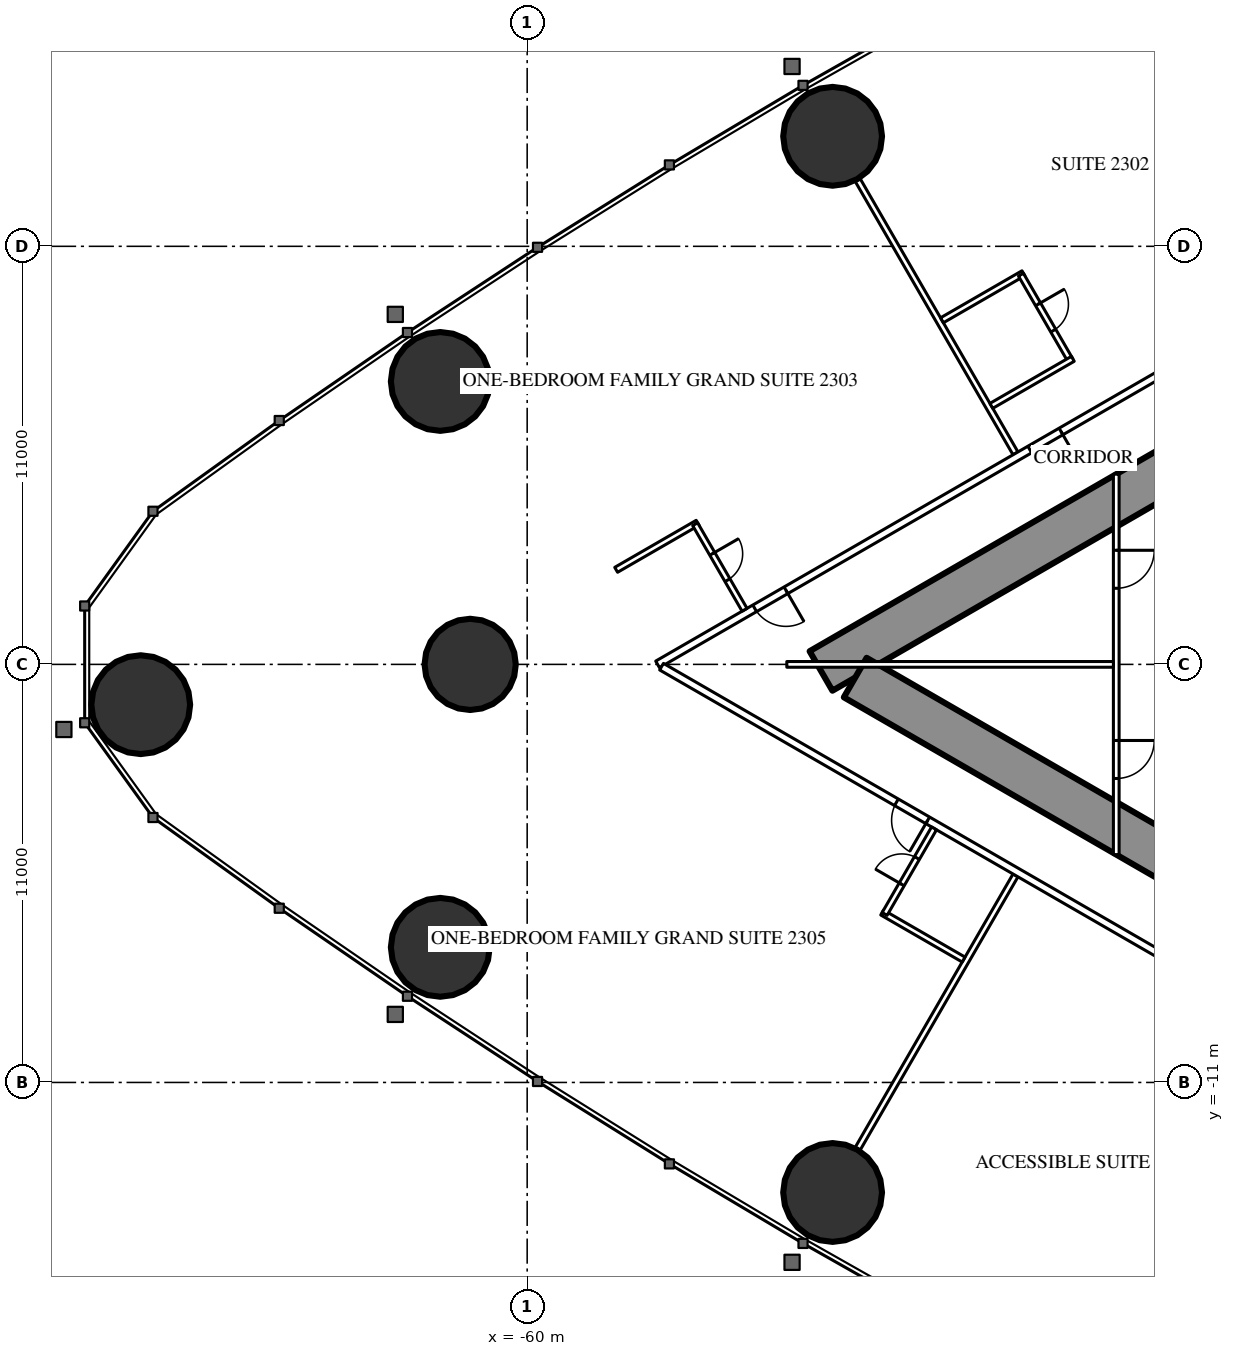
"""IFC4 building model, lengths in metres.
Left out: names, types, materials, properties, quantities, classifications, styles, units other than length and angle.
Written with IfcOpenShell. Run it as: python <this file> out.ifc"""

import sys

from ifc_helpers import new_model, si_unit, direction, frame, frame_2d, origin, origin_2d, place, context, subcontext, project, spatial, rectangle, circle, hollow_circle, extrude, element, fill, save


model = new_model("IFC4")
c1 = context("Model", 3, precision=1e-05, world=origin(), true_north=direction((0.0, 1.0)))
c2 = subcontext(c1, "Body", "Model", "MODEL_VIEW")
j1 = project(units=[si_unit("LENGTHUNIT", "METRE"), si_unit("PLANEANGLEUNIT", "RADIAN")], contexts=[c1])
p1 = place(None, origin())
s1 = spatial("IfcSite", under=j1, at=p1, CompositionType="ELEMENT")
p2 = place(p1, origin())
s2 = spatial("IfcBuilding", under=s1, at=p2, CompositionType="ELEMENT")
p3 = place(p2, frame((0.0, 0.0, 90.6)))
s3 = spatial("IfcBuildingStorey", under=s2, at=p3, CompositionType="ELEMENT", Elevation=90.6)
for number, where, z_axis, x_axis in (
    (1, (-70.168, -1.06, 0.0), (0.0, 0.0, 1.0), (1.0, 0.0, 0.0)),
    (2, (-62.287, -7.445, 0.0), (0.0, 0.0, 1.0), (1.0, 0.0, 0.0)),
    (3, (-51.963, -13.895, 0.0), (0.0, 0.0, 1.0), (1.0, 0.0, 0.0)),
    (4, (-51.963, 13.895, 0.0), (0.0, 0.0, 1.0), (1.0, 0.0, 0.0)),
    (5, (-62.287, 7.445, 0.0), (0.0, 0.0, 1.0), (1.0, 0.0, 0.0)),
):
    element("IfcColumn", number, at=place(p3, frame(where, z_axis=z_axis, x_axis=x_axis)), inside=s3, PredefinedType="COLUMN", context=c2, shape_type="SweptSolid", body=[
        extrude(hollow_circle(Radius=1.3, WallThickness=0.1, at=origin_2d()), origin(), (0.0, 0.0, 1.0), 3.5),
    ])
p4 = place(p3, frame((-61.5, 0.0, 0.0), z_axis=(0.0, 0.0, 1.0), x_axis=(1.0, 0.0, 0.0)))
e6 = element("IfcColumn", 6, at=p4, inside=s3, PredefinedType="COLUMN", context=c2, shape_type="SweptSolid", body=[
    extrude(circle(Radius=1.2, at=origin_2d()), origin(), (0.0, 0.0, 1.0), 3.5),
])
p5 = place(p3, frame((-27.2, 14.3, 0.0), z_axis=(0.0, 0.0, 1.0), x_axis=(-0.866026593062, -0.499997940104, 0.0)))
e7 = element("IfcWall", 7, at=p5, inside=s3, PredefinedType="SHEAR", context=c2, shape_type="SweptSolid", body=[
    extrude(rectangle(XDim=28.946, YDim=1.2, at=frame_2d((14.473, 0.0))), origin(), (0.0, 0.0, 1.0), 3.5),
])
p6 = place(p5, frame((4.6, 0.0, 0.0)))
e8 = element("IfcOpeningElement", 8, at=p6, cuts=e7, PredefinedType="OPENING", context=c2, shape_type="SweptSolid", body=[
    extrude(rectangle(XDim=1.0, YDim=2.2, at=frame_2d((0.5, 1.1))), frame((0.0, 0.61, 0.0), z_axis=(0.0, -1.0, 0.0), x_axis=(1.0, 0.0, 0.0)), (0.0, 0.0, 1.0), 1.22),
])
p7 = place(p5, frame((13.395, 0.0, 0.0)))
e9 = element("IfcOpeningElement", 9, at=p7, cuts=e7, PredefinedType="OPENING", context=c2, shape_type="SweptSolid", body=[
    extrude(rectangle(XDim=1.8, YDim=2.2, at=frame_2d((0.9, 1.1))), frame((0.0, 0.61, 0.0), z_axis=(0.0, -1.0, 0.0), x_axis=(1.0, 0.0, 0.0)), (0.0, 0.0, 1.0), 1.22),
])
p8 = place(p3, frame((-27.2, -14.3, 0.0), z_axis=(0.0, 0.0, 1.0), x_axis=(-0.866024021859, 0.500002393557, 0.0)))
e10 = element("IfcWall", 10, at=p8, inside=s3, PredefinedType="SHEAR", context=c2, shape_type="SweptSolid", body=[
    extrude(rectangle(XDim=27.907, YDim=1.2, at=frame_2d((13.954, 0.0))), origin(), (0.0, 0.0, 1.0), 3.5),
])
p9 = place(p8, frame((4.6, 0.0, 0.0)))
e11 = element("IfcOpeningElement", 11, at=p9, cuts=e10, PredefinedType="OPENING", context=c2, shape_type="SweptSolid", body=[
    extrude(rectangle(XDim=1.0, YDim=2.2, at=frame_2d((0.5, 1.1))), frame((0.0, 0.61, 0.0), z_axis=(0.0, -1.0, 0.0), x_axis=(1.0, 0.0, 0.0)), (0.0, 0.0, 1.0), 1.22),
])
p10 = place(p8, frame((13.395, 0.0, 0.0)))
e12 = element("IfcOpeningElement", 12, at=p10, cuts=e10, PredefinedType="OPENING", context=c2, shape_type="SweptSolid", body=[
    extrude(rectangle(XDim=1.8, YDim=2.2, at=frame_2d((0.9, 1.1))), frame((0.0, 0.61, 0.0), z_axis=(0.0, -1.0, 0.0), x_axis=(1.0, 0.0, 0.0)), (0.0, 0.0, 1.0), 1.22),
])
for number, where, z_axis, x_axis in (
    (13, (-47.151, 5.552, 0.0), (0.0, 0.0, 1.0), (-0.5, 0.866, 0.0)),
    (14, (-47.151, -5.552, 0.0), (0.0, 0.0, 1.0), (-0.5, -0.866, 0.0)),
):
    element("IfcWall", number, at=place(p3, frame(where, z_axis=z_axis, x_axis=x_axis)), inside=s3, PredefinedType="PARTITIONING", context=c2, shape_type="SweptSolid", body=[
        extrude(rectangle(XDim=8.311, YDim=0.15, at=frame_2d((4.156, 0.0))), origin(), (0.0, 0.0, 1.0), 2.2),
    ])
p11 = place(p3, frame((-37.7, 10.894, 0.0), z_axis=(0.0, 0.0, 1.0), x_axis=(-0.866027905338, -0.499995667157, 0.0)))
e15 = element("IfcWall", 15, at=p11, inside=s3, PredefinedType="PARTITIONING", context=c2, shape_type="SweptSolid", body=[
    extrude(rectangle(XDim=21.787, YDim=0.2, at=frame_2d((10.894, 0.0))), origin(), (0.0, 0.0, 1.0), 3.25),
])
p12 = place(p11, frame((17.887, 0.0, 0.0)))
e16 = element("IfcOpeningElement", 16, at=p12, cuts=e15, PredefinedType="OPENING", context=c2, shape_type="SweptSolid", body=[
    extrude(rectangle(XDim=0.95, YDim=2.2, at=frame_2d((0.475, 1.1))), frame((0.0, 0.11, 0.0), z_axis=(0.0, -1.0, 0.0), x_axis=(1.0, 0.0, 0.0)), (0.0, 0.0, 1.0), 0.22),
])
p13 = place(p11, frame((9.531, 0.0, 0.0)))
e17 = element("IfcOpeningElement", 17, at=p13, cuts=e15, PredefinedType="OPENING", context=c2, shape_type="SweptSolid", body=[
    extrude(rectangle(XDim=0.95, YDim=2.2, at=frame_2d((0.475, 1.1))), frame((0.0, 0.11, 0.0), z_axis=(0.0, -1.0, 0.0), x_axis=(1.0, 0.0, 0.0)), (0.0, 0.0, 1.0), 0.22),
])
p14 = place(p3, frame((-36.92, -11.344, 0.0), z_axis=(0.0, 0.0, 1.0), x_axis=(-0.866028313256, 0.499994960614, 0.0)))
e18 = element("IfcWall", 18, at=p14, inside=s3, PredefinedType="PARTITIONING", context=c2, shape_type="SweptSolid", body=[
    extrude(rectangle(XDim=22.568, YDim=0.2, at=frame_2d((11.284, 0.0))), origin(), (0.0, 0.0, 1.0), 3.25),
])
p15 = place(p14, frame((14.481, 0.0, 0.0)))
e19 = element("IfcOpeningElement", 19, at=p15, cuts=e18, PredefinedType="OPENING", context=c2, shape_type="SweptSolid", body=[
    extrude(rectangle(XDim=0.95, YDim=2.2, at=frame_2d((0.475, 1.1))), frame((0.0, 0.11, 0.0), z_axis=(0.0, -1.0, 0.0), x_axis=(1.0, 0.0, 0.0)), (0.0, 0.0, 1.0), 0.22),
])
p16 = place(p14, frame((3.35, 0.0, 0.0)))
e20 = element("IfcOpeningElement", 20, at=p16, cuts=e18, PredefinedType="OPENING", context=c2, shape_type="SweptSolid", body=[
    extrude(rectangle(XDim=1.0, YDim=2.2, at=frame_2d((0.5, 1.1))), frame((0.0, 0.11, 0.0), z_axis=(0.0, -1.0, 0.0), x_axis=(1.0, 0.0, 0.0)), (0.0, 0.0, 1.0), 0.22),
])
p17 = place(p3, frame((-55.515, 3.726, 0.0), z_axis=(0.0, 0.0, 1.0), x_axis=(-0.866006523861, -0.500032699561, 0.0)))
e21 = element("IfcWall", 21, at=p17, inside=s3, PredefinedType="PARTITIONING", context=c2, shape_type="SweptSolid", body=[
    extrude(rectangle(XDim=2.475, YDim=0.15, at=frame_2d((1.237, 0.0))), origin(), (0.0, 0.0, 1.0), 3.25),
])
p18 = place(p3, frame((-54.28, 1.437, 0.0), z_axis=(0.0, 0.0, 1.0), x_axis=(-0.500006934395, 0.866021400173, 0.0)))
e22 = element("IfcWall", 22, at=p18, inside=s3, PredefinedType="PARTITIONING", context=c2, shape_type="SweptSolid", body=[
    extrude(rectangle(XDim=2.6, YDim=0.15, at=frame_2d((1.3, 0.0))), origin(), (0.0, 0.0, 1.0), 3.25),
])
p19 = place(p18, frame((0.9, 0.0, 0.0)))
e23 = element("IfcOpeningElement", 23, at=p19, cuts=e22, PredefinedType="OPENING", context=c2, shape_type="SweptSolid", body=[
    extrude(rectangle(XDim=0.8, YDim=2.2, at=frame_2d((0.4, 1.1))), frame((0.0, 0.085, 0.0), z_axis=(0.0, -1.0, 0.0), x_axis=(1.0, 0.0, 0.0)), (0.0, 0.0, 1.0), 0.17),
])
p20 = place(p3, frame((-48.516, -7.767, 0.0), z_axis=(0.0, 0.0, 1.0), x_axis=(-0.866031185235, 0.4999899861, 0.0)))
e24 = element("IfcWall", 24, at=p20, inside=s3, PredefinedType="PARTITIONING", context=c2, shape_type="SweptSolid", body=[
    extrude(rectangle(XDim=2.475, YDim=0.15, at=frame_2d((1.238, 0.0))), origin(), (0.0, 0.0, 1.0), 3.25),
])
p21 = place(p3, frame((-49.295, -4.315, 0.0), z_axis=(0.0, 0.0, 1.0), x_axis=(-0.499936506574, -0.866062058628, 0.0)))
e25 = element("IfcWall", 25, at=p21, inside=s3, PredefinedType="PARTITIONING", context=c2, shape_type="SweptSolid", body=[
    extrude(rectangle(XDim=2.6, YDim=0.15, at=frame_2d((1.3, 0.0))), origin(), (0.0, 0.0, 1.0), 3.25),
])
p22 = place(p21, frame((0.9, 0.0, 0.0)))
e26 = element("IfcOpeningElement", 26, at=p22, cuts=e25, PredefinedType="OPENING", context=c2, shape_type="SweptSolid", body=[
    extrude(rectangle(XDim=0.8, YDim=2.2, at=frame_2d((0.4, 1.1))), frame((0.0, 0.085, 0.0), z_axis=(0.0, -1.0, 0.0), x_axis=(1.0, 0.0, 0.0)), (0.0, 0.0, 1.0), 0.17),
])
p23 = place(p3, frame((-46.943, 10.292, 0.0), z_axis=(0.0, 0.0, 1.0), x_axis=(-0.866006523861, -0.500032699561, 0.0)))
e27 = element("IfcWall", 27, at=p23, inside=s3, PredefinedType="PARTITIONING", context=c2, shape_type="SweptSolid", body=[
    extrude(rectangle(XDim=2.475, YDim=0.15, at=frame_2d((1.237, 0.0))), origin(), (0.0, 0.0, 1.0), 3.25),
])
p24 = place(p3, frame((-45.708, 8.002, 0.0), z_axis=(0.0, 0.0, 1.0), x_axis=(-0.500047596559, 0.865997922154, 0.0)))
e28 = element("IfcWall", 28, at=p24, inside=s3, PredefinedType="PARTITIONING", context=c2, shape_type="SweptSolid", body=[
    extrude(rectangle(XDim=2.6, YDim=0.15, at=frame_2d((1.3, 0.0))), origin(), (0.0, 0.0, 1.0), 3.25),
])
p25 = place(p24, frame((0.9, 0.0, 0.0)))
e29 = element("IfcOpeningElement", 29, at=p25, cuts=e28, PredefinedType="OPENING", context=c2, shape_type="SweptSolid", body=[
    extrude(rectangle(XDim=0.8, YDim=2.2, at=frame_2d((0.4, 1.1))), frame((0.0, 0.085, 0.0), z_axis=(0.0, -1.0, 0.0), x_axis=(1.0, 0.0, 0.0)), (0.0, 0.0, 1.0), 0.17),
])
p26 = place(p3, frame((-45.643, 8.04, 0.0), z_axis=(0.0, 0.0, 1.0), x_axis=(-0.866006523861, -0.500032699561, 0.0)))
e30 = element("IfcWall", 30, at=p26, inside=s3, PredefinedType="PARTITIONING", context=c2, shape_type="SweptSolid", body=[
    extrude(rectangle(XDim=2.475, YDim=0.15, at=frame_2d((1.237, 0.0))), origin(), (0.0, 0.0, 1.0), 3.25),
])
p27 = place(p3, frame((-44.5, 5.005, 0.0), z_axis=(0.0, 0.0, 1.0), x_axis=(0.0, -1.0, 0.0)))
e31 = element("IfcWall", 31, at=p27, inside=s3, PredefinedType="PARTITIONING", context=c2, shape_type="SweptSolid", body=[
    extrude(rectangle(XDim=10.009, YDim=0.15, at=frame_2d((5.005, 0.0))), origin(), (0.0, 0.0, 1.0), 2.45),
])
p28 = place(p27, frame((2.002, 0.0, 0.0)))
e32 = element("IfcOpeningElement", 32, at=p28, cuts=e31, PredefinedType="OPENING", context=c2, shape_type="SweptSolid", body=[
    extrude(rectangle(XDim=1.0, YDim=2.2, at=frame_2d((0.5, 1.1))), frame((0.0, 0.085, 0.0), z_axis=(0.0, -1.0, 0.0), x_axis=(1.0, 0.0, 0.0)), (0.0, 0.0, 1.0), 0.17),
])
p29 = place(p27, frame((7.007, 0.0, 0.0)))
e33 = element("IfcOpeningElement", 33, at=p29, cuts=e31, PredefinedType="OPENING", context=c2, shape_type="SweptSolid", body=[
    extrude(rectangle(XDim=1.0, YDim=2.2, at=frame_2d((0.5, 1.1))), frame((0.0, 0.085, 0.0), z_axis=(0.0, -1.0, 0.0), x_axis=(1.0, 0.0, 0.0)), (0.0, 0.0, 1.0), 0.17),
])
p30 = place(p3, frame((-44.575, 0.0, 0.0), z_axis=(0.0, 0.0, 1.0), x_axis=(-1.0, 0.0, 0.0)))
e34 = element("IfcWall", 34, at=p30, inside=s3, PredefinedType="PARTITIONING", context=c2, shape_type="SweptSolid", body=[
    extrude(rectangle(XDim=8.593, YDim=0.15, at=frame_2d((4.297, 0.0))), origin(), (0.0, 0.0, 1.0), 2.2),
])
p31 = place(p19, origin())
e35 = element("IfcDoor", 35, at=p31, inside=s3, OperationType="SINGLE_SWING_RIGHT", PredefinedType="DOOR", context=c2, shape_type="SweptSolid", body=[
    extrude(rectangle(XDim=0.8, YDim=2.2, at=frame_2d((0.4, 1.1))), frame((0.0, 0.025, 0.0), z_axis=(0.0, -1.0, 0.0), x_axis=(1.0, 0.0, 0.0)), (0.0, 0.0, 1.0), 0.05),
])
fill(e23, e35)
p32 = place(p12, origin())
e36 = element("IfcDoor", 36, at=p32, inside=s3, OperationType="SINGLE_SWING_LEFT", PredefinedType="DOOR", context=c2, shape_type="SweptSolid", body=[
    extrude(rectangle(XDim=0.95, YDim=2.2, at=frame_2d((0.475, 1.1))), frame((0.0, 0.025, 0.0), z_axis=(0.0, -1.0, 0.0), x_axis=(1.0, 0.0, 0.0)), (0.0, 0.0, 1.0), 0.05),
])
fill(e16, e36)
p33 = place(p22, origin())
e37 = element("IfcDoor", 37, at=p33, inside=s3, OperationType="SINGLE_SWING_RIGHT", PredefinedType="DOOR", context=c2, shape_type="SweptSolid", body=[
    extrude(rectangle(XDim=0.8, YDim=2.2, at=frame_2d((0.4, 1.1))), frame((0.0, 0.025, 0.0), z_axis=(0.0, -1.0, 0.0), x_axis=(1.0, 0.0, 0.0)), (0.0, 0.0, 1.0), 0.05),
])
fill(e26, e37)
p34 = place(p15, origin())
e38 = element("IfcDoor", 38, at=p34, inside=s3, OperationType="SINGLE_SWING_LEFT", PredefinedType="DOOR", context=c2, shape_type="SweptSolid", body=[
    extrude(rectangle(XDim=0.95, YDim=2.2, at=frame_2d((0.475, 1.1))), frame((0.0, 0.025, 0.0), z_axis=(0.0, -1.0, 0.0), x_axis=(1.0, 0.0, 0.0)), (0.0, 0.0, 1.0), 0.05),
])
fill(e19, e38)
p35 = place(p25, origin())
e39 = element("IfcDoor", 39, at=p35, inside=s3, OperationType="SINGLE_SWING_RIGHT", PredefinedType="DOOR", context=c2, shape_type="SweptSolid", body=[
    extrude(rectangle(XDim=0.8, YDim=2.2, at=frame_2d((0.4, 1.1))), frame((0.0, 0.025, 0.0), z_axis=(0.0, -1.0, 0.0), x_axis=(1.0, 0.0, 0.0)), (0.0, 0.0, 1.0), 0.05),
])
fill(e29, e39)
p36 = place(p13, origin())
e40 = element("IfcDoor", 40, at=p36, inside=s3, OperationType="SINGLE_SWING_LEFT", PredefinedType="DOOR", context=c2, shape_type="SweptSolid", body=[
    extrude(rectangle(XDim=0.95, YDim=2.2, at=frame_2d((0.475, 1.1))), frame((0.0, 0.025, 0.0), z_axis=(0.0, -1.0, 0.0), x_axis=(1.0, 0.0, 0.0)), (0.0, 0.0, 1.0), 0.05),
])
fill(e17, e40)
p37 = place(p28, origin())
e41 = element("IfcDoor", 41, at=p37, inside=s3, OperationType="SINGLE_SWING_LEFT", PredefinedType="DOOR", context=c2, shape_type="SweptSolid", body=[
    extrude(rectangle(XDim=1.0, YDim=2.2, at=frame_2d((0.5, 1.1))), frame((0.0, 0.025, 0.0), z_axis=(0.0, -1.0, 0.0), x_axis=(1.0, 0.0, 0.0)), (0.0, 0.0, 1.0), 0.05),
])
fill(e32, e41)
p38 = place(p29, origin())
e42 = element("IfcDoor", 42, at=p38, inside=s3, OperationType="SINGLE_SWING_LEFT", PredefinedType="DOOR", context=c2, shape_type="SweptSolid", body=[
    extrude(rectangle(XDim=1.0, YDim=2.2, at=frame_2d((0.5, 1.1))), frame((0.0, 0.025, 0.0), z_axis=(0.0, -1.0, 0.0), x_axis=(1.0, 0.0, 0.0)), (0.0, 0.0, 1.0), 0.05),
])
fill(e33, e42)
save(model, sys.argv[1])
